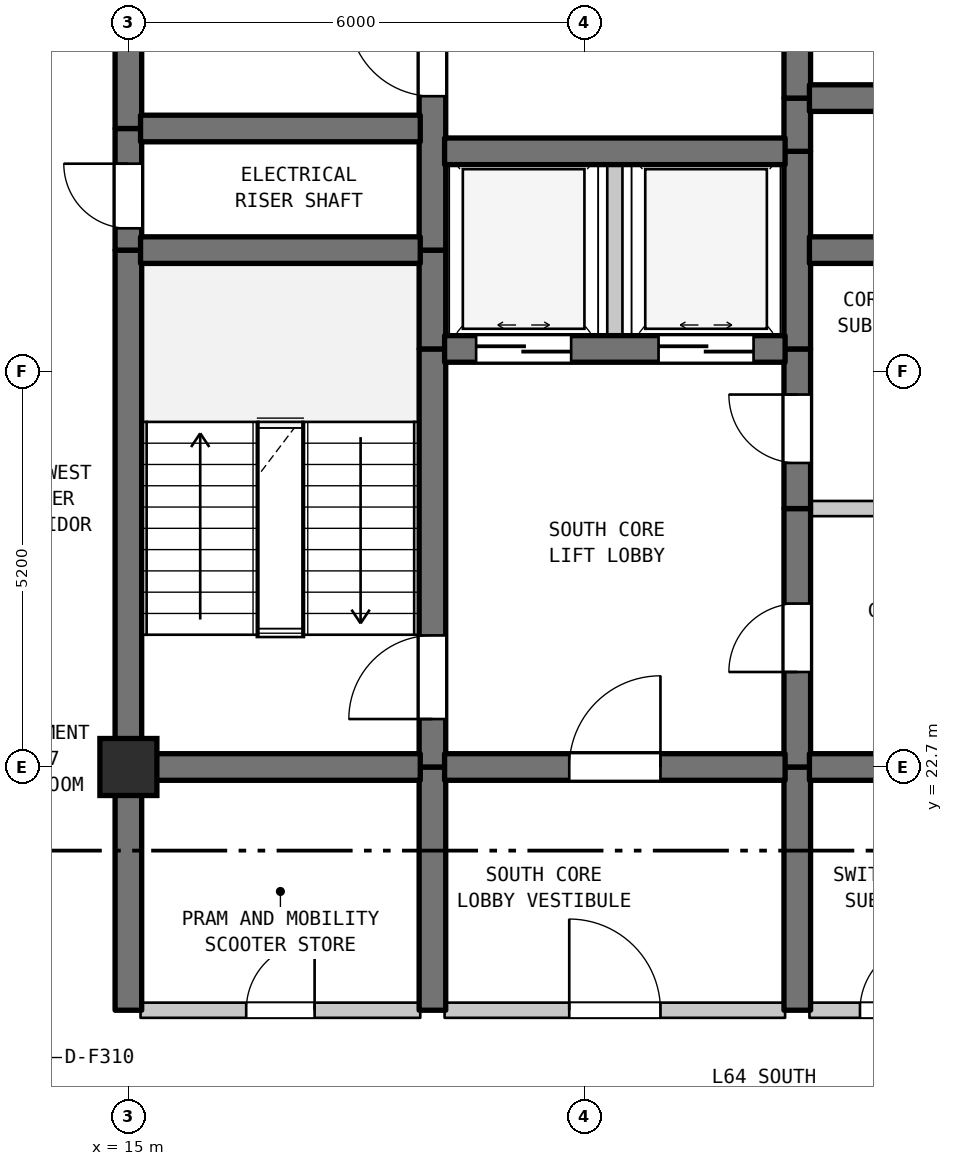
"""IFC4 building model, lengths in metres.
Left out: names, types, materials, properties, quantities, classifications, styles, units other than length and angle.
Written with IfcOpenShell. Run it as: python <this file> out.ifc"""

import sys

from ifc_helpers import new_model, si_unit, direction, frame, frame_2d, origin, origin_2d, place, context, subcontext, project, spatial, rectangle, extrude, element, fill, save


model = new_model("IFC4")
c1 = context("Model", 3, precision=1e-05, world=origin(), true_north=direction((0.0, 1.0)))
c2 = subcontext(c1, "Body", "Model", "MODEL_VIEW")
j1 = project(units=[si_unit("LENGTHUNIT", "METRE"), si_unit("PLANEANGLEUNIT", "RADIAN")], contexts=[c1])
p1 = place(None, origin())
s1 = spatial("IfcSite", under=j1, at=p1, CompositionType="ELEMENT")
p2 = place(p1, origin())
s2 = spatial("IfcBuilding", under=s1, at=p2, CompositionType="ELEMENT")
p3 = place(p2, frame((0.0, 0.0, 258.4)))
s3 = spatial("IfcBuildingStorey", under=s2, at=p3, CompositionType="ELEMENT", Elevation=258.4)
p4 = place(p3, frame((15.0, 22.7, 0.0), z_axis=(0.0, 0.0, 1.0), x_axis=(1.0, 0.0, 0.0)))
e1 = element("IfcColumn", 1, at=p4, inside=s3, PredefinedType="COLUMN", context=c2, shape_type="SweptSolid", body=[
    extrude(rectangle(XDim=0.75, YDim=0.75, at=origin_2d()), origin(), (0.0, 0.0, 1.0), 3.7),
])
p5 = place(p3, frame((15.0, 19.5, 0.0), z_axis=(0.0, 0.0, 1.0), x_axis=(0.0, 1.0, 0.0)))
e2 = element("IfcWall", 2, at=p5, inside=s3, PredefinedType="SHEAR", context=c2, shape_type="SweptSolid", body=[
    extrude(rectangle(XDim=3.2, YDim=0.35, at=frame_2d((1.6, 0.0))), origin(), (0.0, 0.0, 1.0), 3.39),
])
p6 = place(p3, frame((15.0, 22.7, 0.0), z_axis=(0.0, 0.0, 1.0), x_axis=(0.0, 1.0, 0.0)))
e3 = element("IfcWall", 3, at=p6, inside=s3, PredefinedType="SHEAR", context=c2, shape_type="SweptSolid", body=[
    extrude(rectangle(XDim=6.8, YDim=0.35, at=frame_2d((3.4, 0.0))), origin(), (0.0, 0.0, 1.0), 3.39),
])
p7 = place(p3, frame((15.0, 29.5, 0.0), z_axis=(0.0, 0.0, 1.0), x_axis=(0.0, 1.0, 0.0)))
e4 = element("IfcWall", 4, at=p7, inside=s3, PredefinedType="SHEAR", context=c2, shape_type="SweptSolid", body=[
    extrude(rectangle(XDim=1.6, YDim=0.35, at=frame_2d((0.8, 0.0))), origin(), (0.0, 0.0, 1.0), 3.39),
])
p8 = place(p7, frame((0.287, 0.0, 0.0)))
e5 = element("IfcOpeningElement", 5, at=p8, cuts=e4, PredefinedType="OPENING", context=c2, shape_type="SweptSolid", body=[
    extrude(rectangle(XDim=0.85, YDim=2.1, at=frame_2d((0.425, 1.05))), frame((0.0, 0.185, 0.0), z_axis=(0.0, -1.0, 0.0), x_axis=(1.0, 0.0, 0.0)), (0.0, 0.0, 1.0), 0.37),
])
p9 = place(p3, frame((15.0, 31.1, 0.0), z_axis=(0.0, 0.0, 1.0), x_axis=(0.0, 1.0, 0.0)))
e6 = element("IfcWall", 6, at=p9, inside=s3, PredefinedType="SHEAR", context=c2, shape_type="SweptSolid", body=[
    extrude(rectangle(XDim=6.8, YDim=0.35, at=frame_2d((3.4, 0.0))), origin(), (0.0, 0.0, 1.0), 3.39),
])
p10 = place(p3, frame((19.0, 19.5, 0.0), z_axis=(0.0, 0.0, 1.0), x_axis=(0.0, 1.0, 0.0)))
e7 = element("IfcWall", 7, at=p10, inside=s3, PredefinedType="SHEAR", context=c2, shape_type="SweptSolid", body=[
    extrude(rectangle(XDim=3.2, YDim=0.35, at=frame_2d((1.6, 0.0))), origin(), (0.0, 0.0, 1.0), 3.39),
])
p11 = place(p3, frame((19.0, 22.7, 0.0), z_axis=(0.0, 0.0, 1.0), x_axis=(0.0, 1.0, 0.0)))
e8 = element("IfcWall", 8, at=p11, inside=s3, PredefinedType="SHEAR", context=c2, shape_type="SweptSolid", body=[
    extrude(rectangle(XDim=5.5, YDim=0.35, at=frame_2d((2.75, 0.0))), origin(), (0.0, 0.0, 1.0), 3.39),
])
p12 = place(p11, frame((0.631, 0.0, 0.0)))
e9 = element("IfcOpeningElement", 9, at=p12, cuts=e8, PredefinedType="OPENING", context=c2, shape_type="SweptSolid", body=[
    extrude(rectangle(XDim=1.1, YDim=2.15, at=frame_2d((0.55, 1.075))), frame((0.0, 0.185, 0.0), z_axis=(0.0, -1.0, 0.0), x_axis=(1.0, 0.0, 0.0)), (0.0, 0.0, 1.0), 0.37),
])
p13 = place(p3, frame((19.0, 28.2, 0.0), z_axis=(0.0, 0.0, 1.0), x_axis=(0.0, 1.0, 0.0)))
e10 = element("IfcWall", 10, at=p13, inside=s3, PredefinedType="SHEAR", context=c2, shape_type="SweptSolid", body=[
    extrude(rectangle(XDim=1.3, YDim=0.35, at=frame_2d((0.65, 0.0))), origin(), (0.0, 0.0, 1.0), 3.39),
])
p14 = place(p3, frame((19.0, 29.5, 0.0), z_axis=(0.0, 0.0, 1.0), x_axis=(0.0, 1.0, 0.0)))
e11 = element("IfcWall", 11, at=p14, inside=s3, PredefinedType="SHEAR", context=c2, shape_type="SweptSolid", body=[
    extrude(rectangle(XDim=5.5, YDim=0.35, at=frame_2d((2.75, 0.0))), origin(), (0.0, 0.0, 1.0), 3.39),
])
p15 = place(p14, frame((2.025, 0.0, 0.0)))
e12 = element("IfcOpeningElement", 12, at=p15, cuts=e11, PredefinedType="OPENING", context=c2, shape_type="SweptSolid", body=[
    extrude(rectangle(XDim=1.1, YDim=2.15, at=frame_2d((0.55, 1.075))), frame((0.0, 0.185, 0.0), z_axis=(0.0, -1.0, 0.0), x_axis=(1.0, 0.0, 0.0)), (0.0, 0.0, 1.0), 0.37),
])
p16 = place(p3, frame((21.4, 28.2, 0.0), z_axis=(0.0, 0.0, 1.0), x_axis=(0.0, 1.0, 0.0)))
e13 = element("IfcWall", 13, at=p16, inside=s3, PredefinedType="STANDARD", context=c2, shape_type="SweptSolid", body=[
    extrude(rectangle(XDim=2.6, YDim=0.2, at=frame_2d((1.3, 0.0))), origin(), (0.0, 0.0, 1.0), 3.39),
])
p17 = place(p3, frame((23.8, 19.5, 0.0), z_axis=(0.0, 0.0, 1.0), x_axis=(0.0, 1.0, 0.0)))
e14 = element("IfcWall", 14, at=p17, inside=s3, PredefinedType="SHEAR", context=c2, shape_type="SweptSolid", body=[
    extrude(rectangle(XDim=3.2, YDim=0.35, at=frame_2d((1.6, 0.0))), origin(), (0.0, 0.0, 1.0), 3.39),
])
p18 = place(p3, frame((23.8, 22.7, 0.0), z_axis=(0.0, 0.0, 1.0), x_axis=(0.0, 1.0, 0.0)))
e15 = element("IfcWall", 15, at=p18, inside=s3, PredefinedType="SHEAR", context=c2, shape_type="SweptSolid", body=[
    extrude(rectangle(XDim=3.4, YDim=0.35, at=frame_2d((1.7, 0.0))), origin(), (0.0, 0.0, 1.0), 3.39),
])
p19 = place(p18, frame((1.25, 0.0, 0.0)))
e16 = element("IfcOpeningElement", 16, at=p19, cuts=e15, PredefinedType="OPENING", context=c2, shape_type="SweptSolid", body=[
    extrude(rectangle(XDim=0.9, YDim=2.15, at=frame_2d((0.45, 1.075))), frame((0.0, 0.185, 0.0), z_axis=(0.0, -1.0, 0.0), x_axis=(1.0, 0.0, 0.0)), (0.0, 0.0, 1.0), 0.37),
])
p20 = place(p3, frame((23.8, 26.1, 0.0), z_axis=(0.0, 0.0, 1.0), x_axis=(0.0, 1.0, 0.0)))
e17 = element("IfcWall", 17, at=p20, inside=s3, PredefinedType="SHEAR", context=c2, shape_type="SweptSolid", body=[
    extrude(rectangle(XDim=2.1, YDim=0.35, at=frame_2d((1.05, 0.0))), origin(), (0.0, 0.0, 1.0), 3.39),
])
p21 = place(p20, frame((0.6, 0.0, 0.0)))
e18 = element("IfcOpeningElement", 18, at=p21, cuts=e17, PredefinedType="OPENING", context=c2, shape_type="SweptSolid", body=[
    extrude(rectangle(XDim=0.9, YDim=2.15, at=frame_2d((0.45, 1.075))), frame((0.0, 0.185, 0.0), z_axis=(0.0, -1.0, 0.0), x_axis=(1.0, 0.0, 0.0)), (0.0, 0.0, 1.0), 0.37),
])
p22 = place(p3, frame((23.8, 28.2, 0.0), z_axis=(0.0, 0.0, 1.0), x_axis=(0.0, 1.0, 0.0)))
e19 = element("IfcWall", 19, at=p22, inside=s3, PredefinedType="SHEAR", context=c2, shape_type="SweptSolid", body=[
    extrude(rectangle(XDim=2.6, YDim=0.35, at=frame_2d((1.3, 0.0))), origin(), (0.0, 0.0, 1.0), 3.39),
])
p23 = place(p3, frame((23.8, 30.8, 0.0), z_axis=(0.0, 0.0, 1.0), x_axis=(0.0, 1.0, 0.0)))
e20 = element("IfcWall", 20, at=p23, inside=s3, PredefinedType="SHEAR", context=c2, shape_type="SweptSolid", body=[
    extrude(rectangle(XDim=0.7, YDim=0.35, at=frame_2d((0.35, 0.0))), origin(), (0.0, 0.0, 1.0), 3.39),
])
p24 = place(p3, frame((23.8, 31.5, 0.0), z_axis=(0.0, 0.0, 1.0), x_axis=(0.0, 1.0, 0.0)))
e21 = element("IfcWall", 21, at=p24, inside=s3, PredefinedType="SHEAR", context=c2, shape_type="SweptSolid", body=[
    extrude(rectangle(XDim=3.5, YDim=0.35, at=frame_2d((1.75, 0.0))), origin(), (0.0, 0.0, 1.0), 3.39),
])
p25 = place(p24, frame((1.127, 0.0, 0.0)))
e22 = element("IfcOpeningElement", 22, at=p25, cuts=e21, PredefinedType="OPENING", context=c2, shape_type="SweptSolid", body=[
    extrude(rectangle(XDim=1.1, YDim=2.15, at=frame_2d((0.55, 1.075))), frame((0.0, 0.185, 0.0), z_axis=(0.0, -1.0, 0.0), x_axis=(1.0, 0.0, 0.0)), (0.0, 0.0, 1.0), 0.37),
])
p26 = place(p3, frame((15.16, 19.5, 0.0), z_axis=(0.0, 0.0, 1.0), x_axis=(1.0, 0.0, 0.0)))
e23 = element("IfcWall", 23, at=p26, inside=s3, PredefinedType="STANDARD", context=c2, shape_type="SweptSolid", body=[
    extrude(rectangle(XDim=3.68, YDim=0.2, at=frame_2d((1.84, 0.0))), origin(), (0.0, 0.0, 1.0), 3.39),
])
p27 = place(p26, frame((1.39, 0.0, 0.0)))
e24 = element("IfcOpeningElement", 24, at=p27, cuts=e23, PredefinedType="OPENING", context=c2, shape_type="SweptSolid", body=[
    extrude(rectangle(XDim=0.9, YDim=2.15, at=frame_2d((0.45, 1.075))), frame((0.0, 0.11, 0.0), z_axis=(0.0, -1.0, 0.0), x_axis=(1.0, 0.0, 0.0)), (0.0, 0.0, 1.0), 0.22),
])
p28 = place(p3, frame((19.16, 19.5, 0.0), z_axis=(0.0, 0.0, 1.0), x_axis=(1.0, 0.0, 0.0)))
e25 = element("IfcWall", 25, at=p28, inside=s3, PredefinedType="STANDARD", context=c2, shape_type="SweptSolid", body=[
    extrude(rectangle(XDim=4.48, YDim=0.2, at=frame_2d((2.24, 0.0))), origin(), (0.0, 0.0, 1.0), 3.39),
])
p29 = place(p28, frame((1.64, 0.0, 0.0)))
e26 = element("IfcOpeningElement", 26, at=p29, cuts=e25, PredefinedType="OPENING", context=c2, shape_type="SweptSolid", body=[
    extrude(rectangle(XDim=1.2, YDim=2.2, at=frame_2d((0.6, 1.1))), frame((0.0, 0.11, 0.0), z_axis=(0.0, -1.0, 0.0), x_axis=(1.0, 0.0, 0.0)), (0.0, 0.0, 1.0), 0.22),
])
p30 = place(p3, frame((23.96, 19.5, 0.0), z_axis=(0.0, 0.0, 1.0), x_axis=(1.0, 0.0, 0.0)))
e27 = element("IfcWall", 27, at=p30, inside=s3, PredefinedType="STANDARD", context=c2, shape_type="SweptSolid", body=[
    extrude(rectangle(XDim=4.455, YDim=0.2, at=frame_2d((2.228, 0.0))), origin(), (0.0, 0.0, 1.0), 3.39),
])
p31 = place(p30, frame((0.665, 0.0, 0.0)))
e28 = element("IfcOpeningElement", 28, at=p31, cuts=e27, PredefinedType="OPENING", context=c2, shape_type="SweptSolid", body=[
    extrude(rectangle(XDim=0.9, YDim=2.15, at=frame_2d((0.45, 1.075))), frame((0.0, 0.11, 0.0), z_axis=(0.0, -1.0, 0.0), x_axis=(1.0, 0.0, 0.0)), (0.0, 0.0, 1.0), 0.22),
])
p32 = place(p30, frame((2.791, 0.0, 0.0)))
e29 = element("IfcOpeningElement", 29, at=p32, cuts=e27, PredefinedType="OPENING", context=c2, shape_type="SweptSolid", body=[
    extrude(rectangle(XDim=0.9, YDim=2.15, at=frame_2d((0.45, 1.075))), frame((0.0, 0.11, 0.0), z_axis=(0.0, -1.0, 0.0), x_axis=(1.0, 0.0, 0.0)), (0.0, 0.0, 1.0), 0.22),
])
p33 = place(p3, frame((15.16, 22.7, 0.0), z_axis=(0.0, 0.0, 1.0), x_axis=(1.0, 0.0, 0.0)))
e30 = element("IfcWall", 30, at=p33, inside=s3, PredefinedType="SHEAR", context=c2, shape_type="SweptSolid", body=[
    extrude(rectangle(XDim=3.68, YDim=0.35, at=frame_2d((1.84, 0.0))), origin(), (0.0, 0.0, 1.0), 3.39),
])
p34 = place(p3, frame((19.16, 22.7, 0.0), z_axis=(0.0, 0.0, 1.0), x_axis=(1.0, 0.0, 0.0)))
e31 = element("IfcWall", 31, at=p34, inside=s3, PredefinedType="SHEAR", context=c2, shape_type="SweptSolid", body=[
    extrude(rectangle(XDim=4.48, YDim=0.35, at=frame_2d((2.24, 0.0))), origin(), (0.0, 0.0, 1.0), 3.39),
])
p35 = place(p34, frame((1.64, 0.0, 0.0)))
e32 = element("IfcOpeningElement", 32, at=p35, cuts=e31, PredefinedType="OPENING", context=c2, shape_type="SweptSolid", body=[
    extrude(rectangle(XDim=1.2, YDim=2.2, at=frame_2d((0.6, 1.1))), frame((0.0, 0.185, 0.0), z_axis=(0.0, -1.0, 0.0), x_axis=(1.0, 0.0, 0.0)), (0.0, 0.0, 1.0), 0.37),
])
p36 = place(p3, frame((23.96, 22.7, 0.0), z_axis=(0.0, 0.0, 1.0), x_axis=(1.0, 0.0, 0.0)))
e33 = element("IfcWall", 33, at=p36, inside=s3, PredefinedType="SHEAR", context=c2, shape_type="SweptSolid", body=[
    extrude(rectangle(XDim=3.18, YDim=0.35, at=frame_2d((1.59, 0.0))), origin(), (0.0, 0.0, 1.0), 3.39),
])
p37 = place(p3, frame((23.96, 26.1, 0.0), z_axis=(0.0, 0.0, 1.0), x_axis=(1.0, 0.0, 0.0)))
e34 = element("IfcWall", 34, at=p37, inside=s3, PredefinedType="STANDARD", context=c2, shape_type="SweptSolid", body=[
    extrude(rectangle(XDim=3.18, YDim=0.2, at=frame_2d((1.59, 0.0))), origin(), (0.0, 0.0, 1.0), 3.39),
])
p38 = place(p3, frame((19.16, 28.2, 0.0), z_axis=(0.0, 0.0, 1.0), x_axis=(1.0, 0.0, 0.0)))
e35 = element("IfcWall", 35, at=p38, inside=s3, PredefinedType="SHEAR", context=c2, shape_type="SweptSolid", body=[
    extrude(rectangle(XDim=4.48, YDim=0.35, at=frame_2d((2.24, 0.0))), origin(), (0.0, 0.0, 1.0), 3.39),
])
p39 = place(p38, frame((0.415, 0.0, 0.0)))
e36 = element("IfcOpeningElement", 36, at=p39, cuts=e35, PredefinedType="OPENING", context=c2, shape_type="SweptSolid", body=[
    extrude(rectangle(XDim=1.25, YDim=2.2, at=frame_2d((0.625, 1.1))), frame((0.0, 0.185, 0.0), z_axis=(0.0, -1.0, 0.0), x_axis=(1.0, 0.0, 0.0)), (0.0, 0.0, 1.0), 0.37),
])
p40 = place(p38, frame((2.815, 0.0, 0.0)))
e37 = element("IfcOpeningElement", 37, at=p40, cuts=e35, PredefinedType="OPENING", context=c2, shape_type="SweptSolid", body=[
    extrude(rectangle(XDim=1.25, YDim=2.2, at=frame_2d((0.625, 1.1))), frame((0.0, 0.185, 0.0), z_axis=(0.0, -1.0, 0.0), x_axis=(1.0, 0.0, 0.0)), (0.0, 0.0, 1.0), 0.37),
])
p41 = place(p3, frame((15.16, 29.5, 0.0), z_axis=(0.0, 0.0, 1.0), x_axis=(1.0, 0.0, 0.0)))
e38 = element("IfcWall", 38, at=p41, inside=s3, PredefinedType="SHEAR", context=c2, shape_type="SweptSolid", body=[
    extrude(rectangle(XDim=3.68, YDim=0.35, at=frame_2d((1.84, 0.0))), origin(), (0.0, 0.0, 1.0), 3.39),
])
p42 = place(p3, frame((23.96, 29.5, 0.0), z_axis=(0.0, 0.0, 1.0), x_axis=(1.0, 0.0, 0.0)))
e39 = element("IfcWall", 39, at=p42, inside=s3, PredefinedType="SHEAR", context=c2, shape_type="SweptSolid", body=[
    extrude(rectangle(XDim=3.18, YDim=0.35, at=frame_2d((1.59, 0.0))), origin(), (0.0, 0.0, 1.0), 3.39),
])
p43 = place(p3, frame((19.16, 30.8, 0.0), z_axis=(0.0, 0.0, 1.0), x_axis=(1.0, 0.0, 0.0)))
e40 = element("IfcWall", 40, at=p43, inside=s3, PredefinedType="SHEAR", context=c2, shape_type="SweptSolid", body=[
    extrude(rectangle(XDim=4.48, YDim=0.35, at=frame_2d((2.24, 0.0))), origin(), (0.0, 0.0, 1.0), 3.39),
])
p44 = place(p3, frame((15.16, 31.1, 0.0), z_axis=(0.0, 0.0, 1.0), x_axis=(1.0, 0.0, 0.0)))
e41 = element("IfcWall", 41, at=p44, inside=s3, PredefinedType="SHEAR", context=c2, shape_type="SweptSolid", body=[
    extrude(rectangle(XDim=3.68, YDim=0.35, at=frame_2d((1.84, 0.0))), origin(), (0.0, 0.0, 1.0), 3.39),
])
p45 = place(p3, frame((23.96, 31.5, 0.0), z_axis=(0.0, 0.0, 1.0), x_axis=(1.0, 0.0, 0.0)))
e42 = element("IfcWall", 42, at=p45, inside=s3, PredefinedType="SHEAR", context=c2, shape_type="SweptSolid", body=[
    extrude(rectangle(XDim=3.18, YDim=0.35, at=frame_2d((1.59, 0.0))), origin(), (0.0, 0.0, 1.0), 3.39),
])
p46 = place(p45, frame((1.094, 0.0, 0.0)))
e43 = element("IfcOpeningElement", 43, at=p46, cuts=e42, PredefinedType="OPENING", context=c2, shape_type="SweptSolid", body=[
    extrude(rectangle(XDim=0.85, YDim=2.1, at=frame_2d((0.425, 1.05))), frame((0.0, 0.185, 0.0), z_axis=(0.0, -1.0, 0.0), x_axis=(1.0, 0.0, 0.0)), (0.0, 0.0, 1.0), 0.37),
])
p47 = place(p8, origin())
e44 = element("IfcDoor", 44, at=p47, inside=s3, OperationType="SINGLE_SWING_RIGHT", PredefinedType="DOOR", context=c2, shape_type="SweptSolid", body=[
    extrude(rectangle(XDim=0.85, YDim=2.1, at=frame_2d((0.425, 1.05))), frame((0.0, 0.025, 0.0), z_axis=(0.0, -1.0, 0.0), x_axis=(1.0, 0.0, 0.0)), (0.0, 0.0, 1.0), 0.05),
])
fill(e5, e44)
p48 = place(p12, origin())
e45 = element("IfcDoor", 45, at=p48, inside=s3, OperationType="SINGLE_SWING_LEFT", PredefinedType="DOOR", context=c2, shape_type="SweptSolid", body=[
    extrude(rectangle(XDim=1.1, YDim=2.15, at=frame_2d((0.55, 1.075))), frame((0.0, 0.025, 0.0), z_axis=(0.0, -1.0, 0.0), x_axis=(1.0, 0.0, 0.0)), (0.0, 0.0, 1.0), 0.05),
])
fill(e9, e45)
p49 = place(p15, origin())
e46 = element("IfcDoor", 46, at=p49, inside=s3, OperationType="SINGLE_SWING_RIGHT", PredefinedType="DOOR", context=c2, shape_type="SweptSolid", body=[
    extrude(rectangle(XDim=1.1, YDim=2.15, at=frame_2d((0.55, 1.075))), frame((0.0, 0.025, 0.0), z_axis=(0.0, -1.0, 0.0), x_axis=(1.0, 0.0, 0.0)), (0.0, 0.0, 1.0), 0.05),
])
fill(e12, e46)
p50 = place(p19, origin())
e47 = element("IfcDoor", 47, at=p50, inside=s3, OperationType="SINGLE_SWING_LEFT", PredefinedType="DOOR", context=c2, shape_type="SweptSolid", body=[
    extrude(rectangle(XDim=0.9, YDim=2.15, at=frame_2d((0.45, 1.075))), frame((0.0, 0.025, 0.0), z_axis=(0.0, -1.0, 0.0), x_axis=(1.0, 0.0, 0.0)), (0.0, 0.0, 1.0), 0.05),
])
fill(e16, e47)
p51 = place(p21, origin())
e48 = element("IfcDoor", 48, at=p51, inside=s3, OperationType="SINGLE_SWING_RIGHT", PredefinedType="DOOR", context=c2, shape_type="SweptSolid", body=[
    extrude(rectangle(XDim=0.9, YDim=2.15, at=frame_2d((0.45, 1.075))), frame((0.0, 0.025, 0.0), z_axis=(0.0, -1.0, 0.0), x_axis=(1.0, 0.0, 0.0)), (0.0, 0.0, 1.0), 0.05),
])
fill(e18, e48)
p52 = place(p27, origin())
e49 = element("IfcDoor", 49, at=p52, inside=s3, OperationType="SINGLE_SWING_RIGHT", PredefinedType="DOOR", context=c2, shape_type="SweptSolid", body=[
    extrude(rectangle(XDim=0.9, YDim=2.15, at=frame_2d((0.45, 1.075))), frame((0.0, 0.025, 0.0), z_axis=(0.0, -1.0, 0.0), x_axis=(1.0, 0.0, 0.0)), (0.0, 0.0, 1.0), 0.05),
])
fill(e24, e49)
p53 = place(p29, origin())
e50 = element("IfcDoor", 50, at=p53, inside=s3, OperationType="SINGLE_SWING_LEFT", PredefinedType="DOOR", context=c2, shape_type="SweptSolid", body=[
    extrude(rectangle(XDim=1.2, YDim=2.2, at=frame_2d((0.6, 1.1))), frame((0.0, 0.025, 0.0), z_axis=(0.0, -1.0, 0.0), x_axis=(1.0, 0.0, 0.0)), (0.0, 0.0, 1.0), 0.05),
])
fill(e26, e50)
p54 = place(p31, origin())
e51 = element("IfcDoor", 51, at=p54, inside=s3, OperationType="SINGLE_SWING_RIGHT", PredefinedType="DOOR", context=c2, shape_type="SweptSolid", body=[
    extrude(rectangle(XDim=0.9, YDim=2.15, at=frame_2d((0.45, 1.075))), frame((0.0, 0.025, 0.0), z_axis=(0.0, -1.0, 0.0), x_axis=(1.0, 0.0, 0.0)), (0.0, 0.0, 1.0), 0.05),
])
fill(e28, e51)
p55 = place(p35, origin())
e52 = element("IfcDoor", 52, at=p55, inside=s3, OperationType="SINGLE_SWING_RIGHT", PredefinedType="DOOR", context=c2, shape_type="SweptSolid", body=[
    extrude(rectangle(XDim=1.2, YDim=2.2, at=frame_2d((0.6, 1.1))), frame((0.0, 0.025, 0.0), z_axis=(0.0, -1.0, 0.0), x_axis=(1.0, 0.0, 0.0)), (0.0, 0.0, 1.0), 0.05),
])
fill(e32, e52)
p56 = place(p39, origin())
e53 = element("IfcDoor", 53, at=p56, inside=s3, OperationType="DOUBLE_DOOR_SLIDING", PredefinedType="DOOR", context=c2, shape_type="SweptSolid", body=[
    extrude(rectangle(XDim=1.25, YDim=2.2, at=frame_2d((0.625, 1.1))), frame((0.0, 0.025, 0.0), z_axis=(0.0, -1.0, 0.0), x_axis=(1.0, 0.0, 0.0)), (0.0, 0.0, 1.0), 0.05),
])
fill(e36, e53)
p57 = place(p40, origin())
e54 = element("IfcDoor", 54, at=p57, inside=s3, OperationType="DOUBLE_DOOR_SLIDING", PredefinedType="DOOR", context=c2, shape_type="SweptSolid", body=[
    extrude(rectangle(XDim=1.25, YDim=2.2, at=frame_2d((0.625, 1.1))), frame((0.0, 0.025, 0.0), z_axis=(0.0, -1.0, 0.0), x_axis=(1.0, 0.0, 0.0)), (0.0, 0.0, 1.0), 0.05),
])
fill(e37, e54)
save(model, sys.argv[1])
